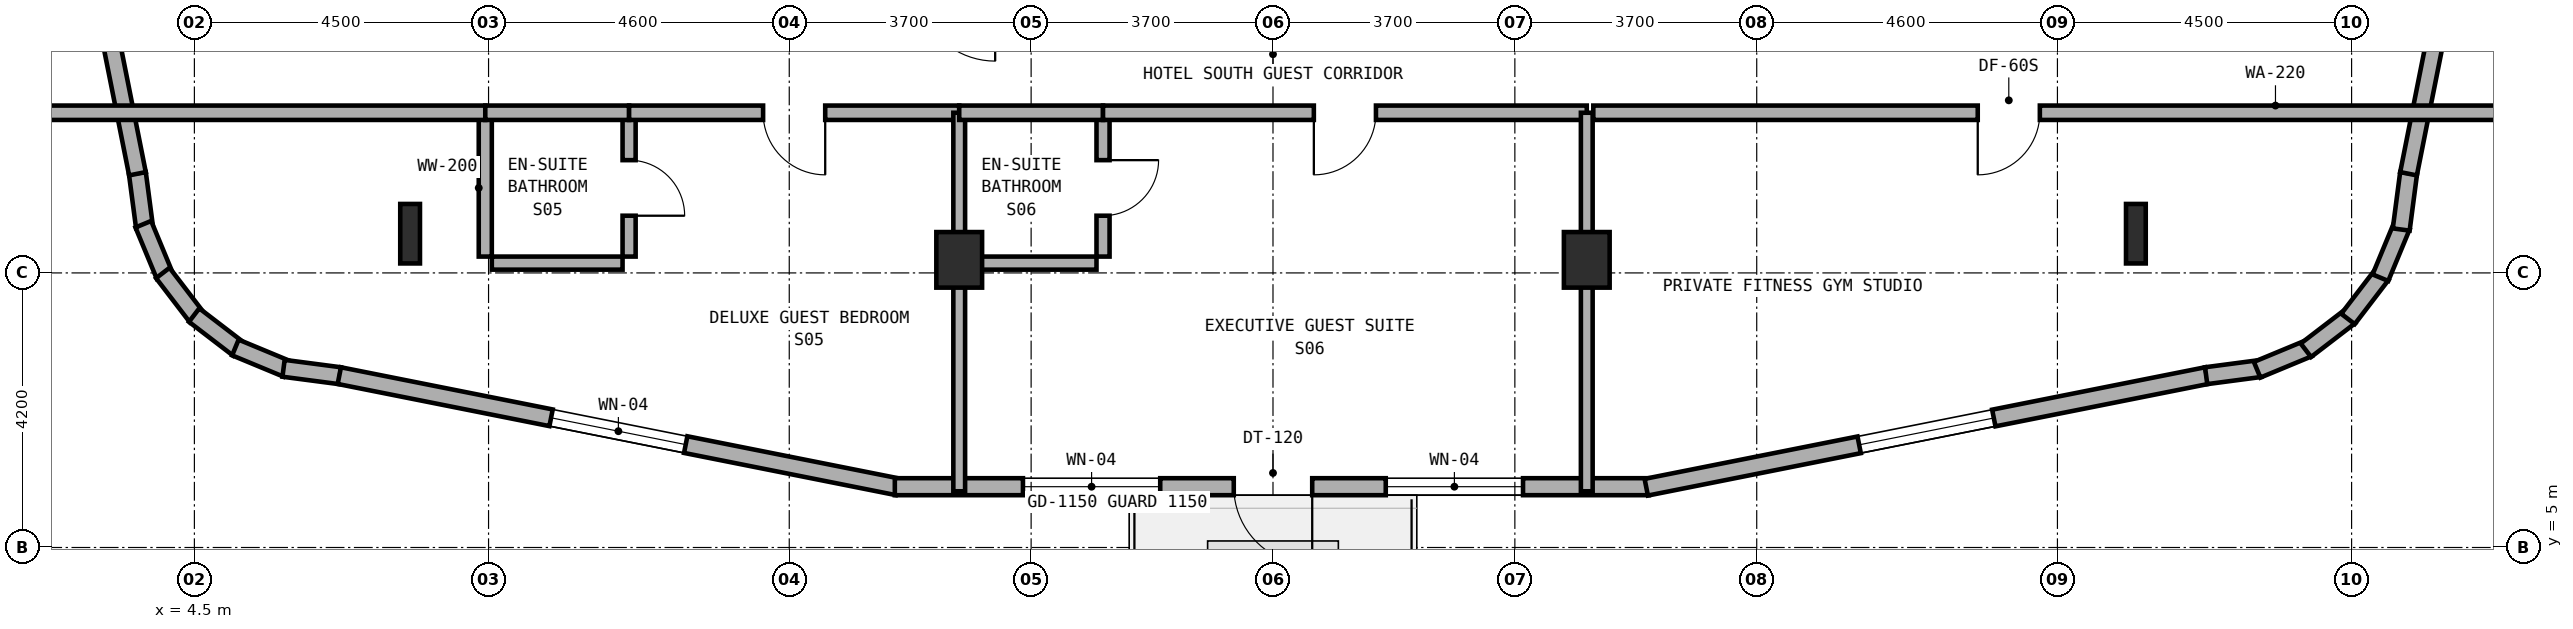
"""IFC4 building model, lengths in metres.
Left out: names, types, materials, properties, quantities, classifications, styles, units other than length and angle.
Written with IfcOpenShell. Run it as: python <this file> out.ifc"""

import sys

from ifc_helpers import new_model, si_unit, direction, frame, frame_2d, origin, origin_2d, place, context, subcontext, project, spatial, rectangle, i_section, extrude, element, fill, save


model = new_model("IFC4")
c1 = context("Model", 3, precision=1e-05, world=origin(), true_north=direction((0.0, 1.0)))
c2 = subcontext(c1, "Body", "Model", "MODEL_VIEW")
j1 = project(units=[si_unit("LENGTHUNIT", "METRE"), si_unit("PLANEANGLEUNIT", "RADIAN")], contexts=[c1])
p1 = place(None, origin())
s1 = spatial("IfcSite", under=j1, at=p1, CompositionType="ELEMENT")
p2 = place(p1, origin())
s2 = spatial("IfcBuilding", under=s1, at=p2, CompositionType="ELEMENT")
p3 = place(p2, frame((0.0, 0.0, 199.1)))
s3 = spatial("IfcBuildingStorey", under=s2, at=p3, CompositionType="ELEMENT", Elevation=199.1)
for number, where, z_axis, x_axis in (
    (1, (16.2, 9.4, 0.0), (0.0, 0.0, 1.0), (1.0, 0.0, 0.0)),
    (2, (25.8, 9.4, 0.0), (0.0, 0.0, 1.0), (1.0, 0.0, 0.0)),
):
    element("IfcColumn", number, at=place(p3, frame(where, z_axis=z_axis, x_axis=x_axis)), inside=s3, PredefinedType="COLUMN", context=c2, shape_type="SweptSolid", body=[
        extrude(rectangle(XDim=0.7, YDim=0.85, at=origin_2d()), origin(), (0.0, 0.0, 1.0), 3.6),
    ])
for number, where, z_axis, x_axis in (
    (3, (7.8, 9.8, 0.0), (0.0, 0.0, 1.0), (1.0, 0.0, 0.0)),
    (4, (34.2, 9.8, 0.0), (0.0, 0.0, 1.0), (1.0, 0.0, 0.0)),
):
    element("IfcColumn", number, at=place(p3, frame(where, z_axis=z_axis, x_axis=x_axis)), inside=s3, PredefinedType="COLUMN", context=c2, shape_type="SweptSolid", body=[
        extrude(i_section(OverallWidth=0.302, OverallDepth=0.91, WebThickness=0.021, FlangeThickness=0.04, FilletRadius=0.03, at=origin_2d()), origin(), (0.0, 0.0, 1.0), 3.6),
    ])
p4 = place(p3, frame((3.628, 10.725, 0.0), z_axis=(0.0, 0.0, 1.0), x_axis=(0.130954667764, -0.9913883573, 0.0)))
e5 = element("IfcWall", 5, at=p4, inside=s3, PredefinedType="STANDARD", context=c2, shape_type="SweptSolid", body=[
    extrude(rectangle(XDim=0.833, YDim=0.26, at=frame_2d((0.417, 0.0))), origin(), (0.0, 0.0, 1.0), 3.32),
])
p5 = place(p3, frame((3.719, 9.945, 0.0), z_axis=(0.0, 0.0, 1.0), x_axis=(0.382985169477, -0.923754491172, 0.0)))
e6 = element("IfcWall", 6, at=p5, inside=s3, PredefinedType="STANDARD", context=c2, shape_type="SweptSolid", body=[
    extrude(rectangle(XDim=0.851, YDim=0.26, at=frame_2d((0.426, 0.0))), origin(), (0.0, 0.0, 1.0), 3.32),
])
for number, where, z_axis, x_axis in (
    (7, (4.017, 9.199, 0.0), (0.0, 0.0, 1.0), (0.608, -0.794, 0.0)),
    (8, (4.496, 8.555, 0.0), (0.0, 0.0, 1.0), (0.794, -0.608, 0.0)),
):
    element("IfcWall", number, at=place(p3, frame(where, z_axis=z_axis, x_axis=x_axis)), inside=s3, PredefinedType="STANDARD", context=c2, shape_type="SweptSolid", body=[
        extrude(rectangle(XDim=0.85, YDim=0.26, at=frame_2d((0.425, 0.0))), origin(), (0.0, 0.0, 1.0), 3.32),
    ])
p6 = place(p3, frame((5.127, 8.059, 0.0), z_axis=(0.0, 0.0, 1.0), x_axis=(0.923652976167, -0.383229930484, 0.0)))
e9 = element("IfcWall", 9, at=p6, inside=s3, PredefinedType="STANDARD", context=c2, shape_type="SweptSolid", body=[
    extrude(rectangle(XDim=0.851, YDim=0.26, at=frame_2d((0.426, 0.0))), origin(), (0.0, 0.0, 1.0), 3.32),
])
p7 = place(p3, frame((5.864, 7.741, 0.0), z_axis=(0.0, 0.0, 1.0), x_axis=(0.991493480548, -0.130156359936, 0.0)))
e10 = element("IfcWall", 10, at=p7, inside=s3, PredefinedType="STANDARD", context=c2, shape_type="SweptSolid", body=[
    extrude(rectangle(XDim=0.868, YDim=0.26, at=frame_2d((0.434, 0.0))), origin(), (0.0, 0.0, 1.0), 3.32),
])
p8 = place(p3, frame((6.717, 7.629, 0.0), z_axis=(0.0, 0.0, 1.0), x_axis=(0.980748582507, -0.1952747242, 0.0)))
e11 = element("IfcWall", 11, at=p8, inside=s3, PredefinedType="STANDARD", context=c2, shape_type="SweptSolid", body=[
    extrude(rectangle(XDim=8.705, YDim=0.26, at=frame_2d((4.353, 0.0))), origin(), (0.0, 0.0, 1.0), 3.32),
])
p9 = place(p8, frame((3.303, 0.0, 0.85)))
e12 = element("IfcOpeningElement", 12, at=p9, cuts=e11, PredefinedType="OPENING", context=c2, shape_type="SweptSolid", body=[
    extrude(rectangle(XDim=2.1, YDim=1.5, at=frame_2d((1.05, 0.75))), frame((0.0, 0.14, 0.0), z_axis=(0.0, -1.0, 0.0), x_axis=(1.0, 0.0, 0.0)), (0.0, 0.0, 1.0), 0.28),
])
p10 = place(p3, frame((15.215, 5.93, 0.0), z_axis=(0.0, 0.0, 1.0), x_axis=(1.0, 0.0, 0.0)))
e13 = element("IfcWall", 13, at=p10, inside=s3, PredefinedType="STANDARD", context=c2, shape_type="SweptSolid", body=[
    extrude(rectangle(XDim=11.535, YDim=0.26, at=frame_2d((5.768, 0.0))), origin(), (0.0, 0.0, 1.0), 3.32),
])
p11 = place(p10, frame((5.185, 0.0, 0.0)))
e14 = element("IfcOpeningElement", 14, at=p11, cuts=e13, PredefinedType="OPENING", context=c2, shape_type="SweptSolid", body=[
    extrude(rectangle(XDim=1.2, YDim=2.15, at=frame_2d((0.6, 1.075))), frame((0.0, 0.14, 0.0), z_axis=(0.0, -1.0, 0.0), x_axis=(1.0, 0.0, 0.0)), (0.0, 0.0, 1.0), 0.28),
])
p12 = place(p10, frame((1.96, 0.0, 0.85)))
e15 = element("IfcOpeningElement", 15, at=p12, cuts=e13, PredefinedType="OPENING", context=c2, shape_type="SweptSolid", body=[
    extrude(rectangle(XDim=2.1, YDim=1.5, at=frame_2d((1.05, 0.75))), frame((0.0, 0.14, 0.0), z_axis=(0.0, -1.0, 0.0), x_axis=(1.0, 0.0, 0.0)), (0.0, 0.0, 1.0), 0.28),
])
p13 = place(p10, frame((7.51, 0.0, 0.85)))
e16 = element("IfcOpeningElement", 16, at=p13, cuts=e13, PredefinedType="OPENING", context=c2, shape_type="SweptSolid", body=[
    extrude(rectangle(XDim=2.1, YDim=1.5, at=frame_2d((1.05, 0.75))), frame((0.0, 0.14, 0.0), z_axis=(0.0, -1.0, 0.0), x_axis=(1.0, 0.0, 0.0)), (0.0, 0.0, 1.0), 0.28),
])
p14 = place(p3, frame((26.71, 5.922, 0.0), z_axis=(0.0, 0.0, 1.0), x_axis=(0.980752174324, 0.195256683773, 0.0)))
e17 = element("IfcWall", 17, at=p14, inside=s3, PredefinedType="STANDARD", context=c2, shape_type="SweptSolid", body=[
    extrude(rectangle(XDim=8.741, YDim=0.26, at=frame_2d((4.371, 0.0))), origin(), (0.0, 0.0, 1.0), 3.32),
])
p15 = place(p14, frame((3.321, 0.0, 0.85)))
e18 = element("IfcOpeningElement", 18, at=p15, cuts=e17, PredefinedType="OPENING", context=c2, shape_type="SweptSolid", body=[
    extrude(rectangle(XDim=2.1, YDim=1.5, at=frame_2d((1.05, 0.75))), frame((0.0, 0.14, 0.0), z_axis=(0.0, -1.0, 0.0), x_axis=(1.0, 0.0, 0.0)), (0.0, 0.0, 1.0), 0.28),
])
p16 = place(p3, frame((35.275, 7.628, 0.0), z_axis=(0.0, 0.0, 1.0), x_axis=(0.9913883573, 0.130954667764, 0.0)))
e19 = element("IfcWall", 19, at=p16, inside=s3, PredefinedType="STANDARD", context=c2, shape_type="SweptSolid", body=[
    extrude(rectangle(XDim=0.833, YDim=0.26, at=frame_2d((0.417, 0.0))), origin(), (0.0, 0.0, 1.0), 3.32),
])
p17 = place(p3, frame((36.055, 7.719, 0.0), z_axis=(0.0, 0.0, 1.0), x_axis=(0.923754491172, 0.382985169477, 0.0)))
e20 = element("IfcWall", 20, at=p17, inside=s3, PredefinedType="STANDARD", context=c2, shape_type="SweptSolid", body=[
    extrude(rectangle(XDim=0.851, YDim=0.26, at=frame_2d((0.426, 0.0))), origin(), (0.0, 0.0, 1.0), 3.32),
])
for number, where, z_axis, x_axis in (
    (21, (36.801, 8.017, 0.0), (0.0, 0.0, 1.0), (0.794, 0.608, 0.0)),
    (22, (37.445, 8.496, 0.0), (0.0, 0.0, 1.0), (0.608, 0.794, 0.0)),
):
    element("IfcWall", number, at=place(p3, frame(where, z_axis=z_axis, x_axis=x_axis)), inside=s3, PredefinedType="STANDARD", context=c2, shape_type="SweptSolid", body=[
        extrude(rectangle(XDim=0.85, YDim=0.26, at=frame_2d((0.425, 0.0))), origin(), (0.0, 0.0, 1.0), 3.32),
    ])
p18 = place(p3, frame((37.941, 9.127, 0.0), z_axis=(0.0, 0.0, 1.0), x_axis=(0.383229930484, 0.923652976167, 0.0)))
e23 = element("IfcWall", 23, at=p18, inside=s3, PredefinedType="STANDARD", context=c2, shape_type="SweptSolid", body=[
    extrude(rectangle(XDim=0.851, YDim=0.26, at=frame_2d((0.426, 0.0))), origin(), (0.0, 0.0, 1.0), 3.32),
])
p19 = place(p3, frame((38.259, 9.864, 0.0), z_axis=(0.0, 0.0, 1.0), x_axis=(0.130156359936, 0.991493480548, 0.0)))
e24 = element("IfcWall", 24, at=p19, inside=s3, PredefinedType="STANDARD", context=c2, shape_type="SweptSolid", body=[
    extrude(rectangle(XDim=0.868, YDim=0.26, at=frame_2d((0.434, 0.0))), origin(), (0.0, 0.0, 1.0), 3.32),
])
p20 = place(p3, frame((38.371, 10.717, 0.0), z_axis=(0.0, 0.0, 1.0), x_axis=(0.195291715883, 0.980745199176, 0.0)))
e25 = element("IfcWall", 25, at=p20, inside=s3, PredefinedType="STANDARD", context=c2, shape_type="SweptSolid", body=[
    extrude(rectangle(XDim=8.771, YDim=0.26, at=frame_2d((4.385, 0.0))), origin(), (0.0, 0.0, 1.0), 3.32),
])
p21 = place(p20, frame((3.873, 0.0, 0.85)))
e26 = element("IfcOpeningElement", 26, at=p21, cuts=e25, PredefinedType="OPENING", context=c2, shape_type="SweptSolid", body=[
    extrude(rectangle(XDim=2.1, YDim=1.5, at=frame_2d((1.05, 0.75))), frame((0.0, 0.14, 0.0), z_axis=(0.0, -1.0, 0.0), x_axis=(1.0, 0.0, 0.0)), (0.0, 0.0, 1.0), 0.28),
])
p22 = place(p3, frame((1.916, 19.319, 0.0), z_axis=(0.0, 0.0, 1.0), x_axis=(0.195291715883, -0.980745199176, 0.0)))
e27 = element("IfcWall", 27, at=p22, inside=s3, PredefinedType="STANDARD", context=c2, shape_type="SweptSolid", body=[
    extrude(rectangle(XDim=8.771, YDim=0.26, at=frame_2d((4.385, 0.0))), origin(), (0.0, 0.0, 1.0), 3.32),
])
p23 = place(p22, frame((2.798, 0.0, 0.85)))
e28 = element("IfcOpeningElement", 28, at=p23, cuts=e27, PredefinedType="OPENING", context=c2, shape_type="SweptSolid", body=[
    extrude(rectangle(XDim=2.1, YDim=1.5, at=frame_2d((1.05, 0.75))), frame((0.0, 0.14, 0.0), z_axis=(0.0, -1.0, 0.0), x_axis=(1.0, 0.0, 0.0)), (0.0, 0.0, 1.0), 0.28),
])
p24 = place(p3, frame((11.15, 9.45, 0.0), z_axis=(0.0, 0.0, 1.0), x_axis=(0.0, 1.0, 0.0)))
e29 = element("IfcWall", 29, at=p24, inside=s3, PredefinedType="PLUMBINGWALL", context=c2, shape_type="SweptSolid", body=[
    extrude(rectangle(XDim=2.1, YDim=0.2, at=frame_2d((1.05, 0.0))), origin(), (0.0, 0.0, 1.0), 3.015),
])
p25 = place(p24, frame((0.625, 0.0, 0.0)))
e30 = element("IfcOpeningElement", 30, at=p25, cuts=e29, PredefinedType="OPENING", context=c2, shape_type="SweptSolid", body=[
    extrude(rectangle(XDim=0.85, YDim=2.1, at=frame_2d((0.425, 1.05))), frame((0.0, 0.11, 0.0), z_axis=(0.0, -1.0, 0.0), x_axis=(1.0, 0.0, 0.0)), (0.0, 0.0, 1.0), 0.22),
])
p26 = place(p3, frame((9.05, 9.35, 0.0), z_axis=(0.0, 0.0, 1.0), x_axis=(1.0, 0.0, 0.0)))
e31 = element("IfcWall", 31, at=p26, inside=s3, PredefinedType="PLUMBINGWALL", context=c2, shape_type="SweptSolid", body=[
    extrude(rectangle(XDim=2.0, YDim=0.2, at=frame_2d((1.0, 0.0))), origin(), (0.0, 0.0, 1.0), 3.32),
])
p27 = place(p3, frame((8.95, 9.45, 0.0), z_axis=(0.0, 0.0, 1.0), x_axis=(0.0, 1.0, 0.0)))
e32 = element("IfcWall", 32, at=p27, inside=s3, PredefinedType="PLUMBINGWALL", context=c2, shape_type="SweptSolid", body=[
    extrude(rectangle(XDim=2.1, YDim=0.2, at=frame_2d((1.05, 0.0))), origin(), (0.0, 0.0, 1.0), 3.015),
])
p28 = place(p3, frame((1.96, 11.65, 0.0), z_axis=(0.0, 0.0, 1.0), x_axis=(1.0, 0.0, 0.0)))
e33 = element("IfcWall", 33, at=p28, inside=s3, PredefinedType="SOLIDWALL", context=c2, shape_type="SweptSolid", body=[
    extrude(rectangle(XDim=6.99, YDim=0.22, at=frame_2d((3.495, 0.0))), origin(), (0.0, 0.0, 1.0), 2.695),
])
p29 = place(p3, frame((8.95, 11.65, 0.0), z_axis=(0.0, 0.0, 1.0), x_axis=(1.0, 0.0, 0.0)))
e34 = element("IfcWall", 34, at=p29, inside=s3, PredefinedType="SOLIDWALL", context=c2, shape_type="SweptSolid", body=[
    extrude(rectangle(XDim=2.2, YDim=0.22, at=frame_2d((1.1, 0.0))), origin(), (0.0, 0.0, 1.0), 3.32),
])
p30 = place(p3, frame((11.15, 11.65, 0.0), z_axis=(0.0, 0.0, 1.0), x_axis=(1.0, 0.0, 0.0)))
e35 = element("IfcWall", 35, at=p30, inside=s3, PredefinedType="SOLIDWALL", context=c2, shape_type="SweptSolid", body=[
    extrude(rectangle(XDim=5.05, YDim=0.22, at=frame_2d((2.525, 0.0))), origin(), (0.0, 0.0, 1.0), 2.695),
])
p31 = place(p30, frame((2.05, 0.0, 0.0)))
e36 = element("IfcOpeningElement", 36, at=p31, cuts=e35, PredefinedType="OPENING", context=c2, shape_type="SweptSolid", body=[
    extrude(rectangle(XDim=0.95, YDim=2.1, at=frame_2d((0.475, 1.05))), frame((0.0, 0.12, 0.0), z_axis=(0.0, -1.0, 0.0), x_axis=(1.0, 0.0, 0.0)), (0.0, 0.0, 1.0), 0.24),
])
p32 = place(p3, frame((16.2, 5.86, 0.0), z_axis=(0.0, 0.0, 1.0), x_axis=(0.0, 1.0, 0.0)))
e37 = element("IfcWall", 37, at=p32, inside=s3, PredefinedType="SOLIDWALL", context=c2, shape_type="SweptSolid", body=[
    extrude(rectangle(XDim=5.79, YDim=0.18, at=frame_2d((2.895, 0.0))), origin(), (0.0, 0.0, 1.0), 2.695),
])
p33 = place(p3, frame((18.4, 9.45, 0.0), z_axis=(0.0, 0.0, 1.0), x_axis=(0.0, 1.0, 0.0)))
e38 = element("IfcWall", 38, at=p33, inside=s3, PredefinedType="PLUMBINGWALL", context=c2, shape_type="SweptSolid", body=[
    extrude(rectangle(XDim=2.1, YDim=0.2, at=frame_2d((1.05, 0.0))), origin(), (0.0, 0.0, 1.0), 3.015),
])
p34 = place(p33, frame((0.625, 0.0, 0.0)))
e39 = element("IfcOpeningElement", 39, at=p34, cuts=e38, PredefinedType="OPENING", context=c2, shape_type="SweptSolid", body=[
    extrude(rectangle(XDim=0.85, YDim=2.1, at=frame_2d((0.425, 1.05))), frame((0.0, 0.11, 0.0), z_axis=(0.0, -1.0, 0.0), x_axis=(1.0, 0.0, 0.0)), (0.0, 0.0, 1.0), 0.22),
])
p35 = place(p3, frame((16.3, 9.35, 0.0), z_axis=(0.0, 0.0, 1.0), x_axis=(1.0, 0.0, 0.0)))
e40 = element("IfcWall", 40, at=p35, inside=s3, PredefinedType="PLUMBINGWALL", context=c2, shape_type="SweptSolid", body=[
    extrude(rectangle(XDim=2.0, YDim=0.2, at=frame_2d((1.0, 0.0))), origin(), (0.0, 0.0, 1.0), 3.015),
])
p36 = place(p3, frame((16.2, 11.65, 0.0), z_axis=(0.0, 0.0, 1.0), x_axis=(1.0, 0.0, 0.0)))
e41 = element("IfcWall", 41, at=p36, inside=s3, PredefinedType="SOLIDWALL", context=c2, shape_type="SweptSolid", body=[
    extrude(rectangle(XDim=2.2, YDim=0.22, at=frame_2d((1.1, 0.0))), origin(), (0.0, 0.0, 1.0), 2.695),
])
p37 = place(p3, frame((18.4, 11.65, 0.0), z_axis=(0.0, 0.0, 1.0), x_axis=(1.0, 0.0, 0.0)))
e42 = element("IfcWall", 42, at=p37, inside=s3, PredefinedType="SOLIDWALL", context=c2, shape_type="SweptSolid", body=[
    extrude(rectangle(XDim=7.4, YDim=0.22, at=frame_2d((3.7, 0.0))), origin(), (0.0, 0.0, 1.0), 2.695),
])
p38 = place(p37, frame((3.225, 0.0, 0.0)))
e43 = element("IfcOpeningElement", 43, at=p38, cuts=e42, PredefinedType="OPENING", context=c2, shape_type="SweptSolid", body=[
    extrude(rectangle(XDim=0.95, YDim=2.1, at=frame_2d((0.475, 1.05))), frame((0.0, 0.12, 0.0), z_axis=(0.0, -1.0, 0.0), x_axis=(1.0, 0.0, 0.0)), (0.0, 0.0, 1.0), 0.24),
])
p39 = place(p3, frame((25.8, 5.86, 0.0), z_axis=(0.0, 0.0, 1.0), x_axis=(0.0, 1.0, 0.0)))
e44 = element("IfcWall", 44, at=p39, inside=s3, PredefinedType="SOLIDWALL", context=c2, shape_type="SweptSolid", body=[
    extrude(rectangle(XDim=5.79, YDim=0.18, at=frame_2d((2.895, 0.0))), origin(), (0.0, 0.0, 1.0), 2.695),
])
p40 = place(p3, frame((25.9, 11.65, 0.0), z_axis=(0.0, 0.0, 1.0), x_axis=(1.0, 0.0, 0.0)))
e45 = element("IfcWall", 45, at=p40, inside=s3, PredefinedType="SOLIDWALL", context=c2, shape_type="SweptSolid", body=[
    extrude(rectangle(XDim=14.04, YDim=0.22, at=frame_2d((7.02, 0.0))), origin(), (0.0, 0.0, 1.0), 2.695),
])
p41 = place(p40, frame((5.881, 0.0, 0.0)))
e46 = element("IfcOpeningElement", 46, at=p41, cuts=e45, PredefinedType="OPENING", context=c2, shape_type="SweptSolid", body=[
    extrude(rectangle(XDim=0.95, YDim=2.1, at=frame_2d((0.475, 1.05))), frame((0.0, 0.12, 0.0), z_axis=(0.0, -1.0, 0.0), x_axis=(1.0, 0.0, 0.0)), (0.0, 0.0, 1.0), 0.24),
])
p42 = place(p9, origin())
e47 = element("IfcWindow", 47, at=p42, inside=s3, PartitioningType="SINGLE_PANEL", PredefinedType="WINDOW", context=c2, shape_type="SweptSolid", body=[
    extrude(rectangle(XDim=2.1, YDim=1.5, at=frame_2d((1.05, 0.75))), frame((0.0, 0.03, 0.0), z_axis=(0.0, -1.0, 0.0), x_axis=(1.0, 0.0, 0.0)), (0.0, 0.0, 1.0), 0.06),
])
fill(e12, e47)
p43 = place(p11, frame((1.2, 0.0, 0.0), z_axis=(0.0, 0.0, 1.0), x_axis=(-1.0, 0.0, 0.0)))
e48 = element("IfcDoor", 48, at=p43, inside=s3, OperationType="SINGLE_SWING_LEFT", PredefinedType="DOOR", context=c2, shape_type="SweptSolid", body=[
    extrude(rectangle(XDim=1.2, YDim=2.15, at=frame_2d((0.6, 1.075))), frame((0.0, 0.025, 0.0), z_axis=(0.0, -1.0, 0.0), x_axis=(1.0, 0.0, 0.0)), (0.0, 0.0, 1.0), 0.05),
])
fill(e14, e48)
p44 = place(p12, origin())
e49 = element("IfcWindow", 49, at=p44, inside=s3, PartitioningType="SINGLE_PANEL", PredefinedType="WINDOW", context=c2, shape_type="SweptSolid", body=[
    extrude(rectangle(XDim=2.1, YDim=1.5, at=frame_2d((1.05, 0.75))), frame((0.0, 0.03, 0.0), z_axis=(0.0, -1.0, 0.0), x_axis=(1.0, 0.0, 0.0)), (0.0, 0.0, 1.0), 0.06),
])
fill(e15, e49)
p45 = place(p13, origin())
e50 = element("IfcWindow", 50, at=p45, inside=s3, PartitioningType="SINGLE_PANEL", PredefinedType="WINDOW", context=c2, shape_type="SweptSolid", body=[
    extrude(rectangle(XDim=2.1, YDim=1.5, at=frame_2d((1.05, 0.75))), frame((0.0, 0.03, 0.0), z_axis=(0.0, -1.0, 0.0), x_axis=(1.0, 0.0, 0.0)), (0.0, 0.0, 1.0), 0.06),
])
fill(e16, e50)
p46 = place(p15, origin())
e51 = element("IfcWindow", 51, at=p46, inside=s3, PartitioningType="SINGLE_PANEL", PredefinedType="WINDOW", context=c2, shape_type="SweptSolid", body=[
    extrude(rectangle(XDim=2.1, YDim=1.5, at=frame_2d((1.05, 0.75))), frame((0.0, 0.03, 0.0), z_axis=(0.0, -1.0, 0.0), x_axis=(1.0, 0.0, 0.0)), (0.0, 0.0, 1.0), 0.06),
])
fill(e18, e51)
p47 = place(p25, frame((0.85, 0.0, 0.0), z_axis=(0.0, 0.0, 1.0), x_axis=(-1.0, 0.0, 0.0)))
e52 = element("IfcDoor", 52, at=p47, inside=s3, OperationType="SINGLE_SWING_RIGHT", PredefinedType="DOOR", context=c2, shape_type="SweptSolid", body=[
    extrude(rectangle(XDim=0.85, YDim=2.1, at=frame_2d((0.425, 1.05))), frame((0.0, 0.025, 0.0), z_axis=(0.0, -1.0, 0.0), x_axis=(1.0, 0.0, 0.0)), (0.0, 0.0, 1.0), 0.05),
])
fill(e30, e52)
p48 = place(p31, frame((0.95, 0.0, 0.0), z_axis=(0.0, 0.0, 1.0), x_axis=(-1.0, 0.0, 0.0)))
e53 = element("IfcDoor", 53, at=p48, inside=s3, OperationType="SINGLE_SWING_LEFT", PredefinedType="DOOR", context=c2, shape_type="SweptSolid", body=[
    extrude(rectangle(XDim=0.95, YDim=2.1, at=frame_2d((0.475, 1.05))), frame((0.0, 0.025, 0.0), z_axis=(0.0, -1.0, 0.0), x_axis=(1.0, 0.0, 0.0)), (0.0, 0.0, 1.0), 0.05),
])
fill(e36, e53)
p49 = place(p34, frame((0.85, 0.0, 0.0), z_axis=(0.0, 0.0, 1.0), x_axis=(-1.0, 0.0, 0.0)))
e54 = element("IfcDoor", 54, at=p49, inside=s3, OperationType="SINGLE_SWING_LEFT", PredefinedType="DOOR", context=c2, shape_type="SweptSolid", body=[
    extrude(rectangle(XDim=0.85, YDim=2.1, at=frame_2d((0.425, 1.05))), frame((0.0, 0.025, 0.0), z_axis=(0.0, -1.0, 0.0), x_axis=(1.0, 0.0, 0.0)), (0.0, 0.0, 1.0), 0.05),
])
fill(e39, e54)
p50 = place(p38, frame((0.95, 0.0, 0.0), z_axis=(0.0, 0.0, 1.0), x_axis=(-1.0, 0.0, 0.0)))
e55 = element("IfcDoor", 55, at=p50, inside=s3, OperationType="SINGLE_SWING_RIGHT", PredefinedType="DOOR", context=c2, shape_type="SweptSolid", body=[
    extrude(rectangle(XDim=0.95, YDim=2.1, at=frame_2d((0.475, 1.05))), frame((0.0, 0.025, 0.0), z_axis=(0.0, -1.0, 0.0), x_axis=(1.0, 0.0, 0.0)), (0.0, 0.0, 1.0), 0.05),
])
fill(e43, e55)
p51 = place(p41, frame((0.95, 0.0, 0.0), z_axis=(0.0, 0.0, 1.0), x_axis=(-1.0, 0.0, 0.0)))
e56 = element("IfcDoor", 56, at=p51, inside=s3, OperationType="SINGLE_SWING_RIGHT", PredefinedType="DOOR", context=c2, shape_type="SweptSolid", body=[
    extrude(rectangle(XDim=0.95, YDim=2.1, at=frame_2d((0.475, 1.05))), frame((0.0, 0.025, 0.0), z_axis=(0.0, -1.0, 0.0), x_axis=(1.0, 0.0, 0.0)), (0.0, 0.0, 1.0), 0.05),
])
fill(e46, e56)
save(model, sys.argv[1])
